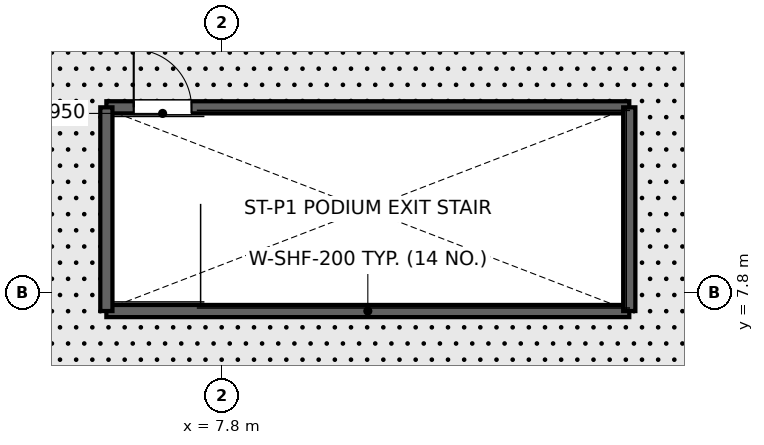
"""IFC4 building model, lengths in metres.
Left out: names, types, materials, properties, quantities, classifications, styles, units other than length and angle.
Written with IfcOpenShell. Run it as: python <this file> out.ifc"""

import sys

from ifc_helpers import new_model, si_unit, direction, frame, frame_2d, origin, place, context, subcontext, project, spatial, rectangle, extrude, element, fill, save


model = new_model("IFC4")
c1 = context("Model", 3, precision=1e-05, world=origin(), true_north=direction((0.0, 1.0)))
c2 = subcontext(c1, "Body", "Model", "MODEL_VIEW")
j1 = project(units=[si_unit("LENGTHUNIT", "METRE"), si_unit("PLANEANGLEUNIT", "RADIAN")], contexts=[c1])
p1 = place(None, origin())
s1 = spatial("IfcSite", under=j1, at=p1, CompositionType="ELEMENT")
p2 = place(p1, origin())
s2 = spatial("IfcBuilding", under=s1, at=p2, CompositionType="ELEMENT")
p3 = place(p2, frame((0.0, 0.0, 24.0)))
s3 = spatial("IfcBuildingStorey", under=s2, at=p3, CompositionType="ELEMENT", Elevation=24.0)
p4 = place(p3, frame((5.9, 7.5, 0.0), z_axis=(0.0, 0.0, 1.0), x_axis=(1.0, 0.0, 0.0)))
e1 = element("IfcWall", 1, at=p4, inside=s3, PredefinedType="SHEAR", context=c2, shape_type="SweptSolid", body=[
    extrude(rectangle(XDim=8.6, YDim=0.2, at=frame_2d((4.3, 0.0))), origin(), (0.0, 0.0, 1.0), 3.58),
])
p5 = place(p3, frame((5.9, 10.85, 0.0), z_axis=(0.0, 0.0, 1.0), x_axis=(1.0, 0.0, 0.0)))
e2 = element("IfcWall", 2, at=p5, inside=s3, PredefinedType="SHEAR", context=c2, shape_type="SweptSolid", body=[
    extrude(rectangle(XDim=8.6, YDim=0.2, at=frame_2d((4.3, 0.0))), origin(), (0.0, 0.0, 1.0), 3.58),
])
p6 = place(p5, frame((0.45, 0.0, 0.0)))
e3 = element("IfcOpeningElement", 3, at=p6, cuts=e2, PredefinedType="OPENING", context=c2, shape_type="SweptSolid", body=[
    extrude(rectangle(XDim=0.95, YDim=2.1, at=frame_2d((0.475, 1.05))), frame((0.0, 0.11, 0.0), z_axis=(0.0, -1.0, 0.0), x_axis=(1.0, 0.0, 0.0)), (0.0, 0.0, 1.0), 0.22),
])
for number, where, z_axis, x_axis in (
    (4, (5.9, 7.5, 0.0), (0.0, 0.0, 1.0), (0.0, 1.0, 0.0)),
    (5, (14.5, 7.5, 0.0), (0.0, 0.0, 1.0), (0.0, 1.0, 0.0)),
):
    element("IfcWall", number, at=place(p3, frame(where, z_axis=z_axis, x_axis=x_axis)), inside=s3, PredefinedType="SHEAR", context=c2, shape_type="SweptSolid", body=[
        extrude(rectangle(XDim=3.35, YDim=0.2, at=frame_2d((1.675, 0.0))), origin(), (0.0, 0.0, 1.0), 3.58),
    ])
p7 = place(p6, origin())
e6 = element("IfcDoor", 6, at=p7, inside=s3, OperationType="SINGLE_SWING_LEFT", PredefinedType="DOOR", context=c2, shape_type="SweptSolid", body=[
    extrude(rectangle(XDim=0.95, YDim=2.1, at=frame_2d((0.475, 1.05))), frame((0.0, 0.025, 0.0), z_axis=(0.0, -1.0, 0.0), x_axis=(1.0, 0.0, 0.0)), (0.0, 0.0, 1.0), 0.05),
])
fill(e3, e6)
save(model, sys.argv[1])
